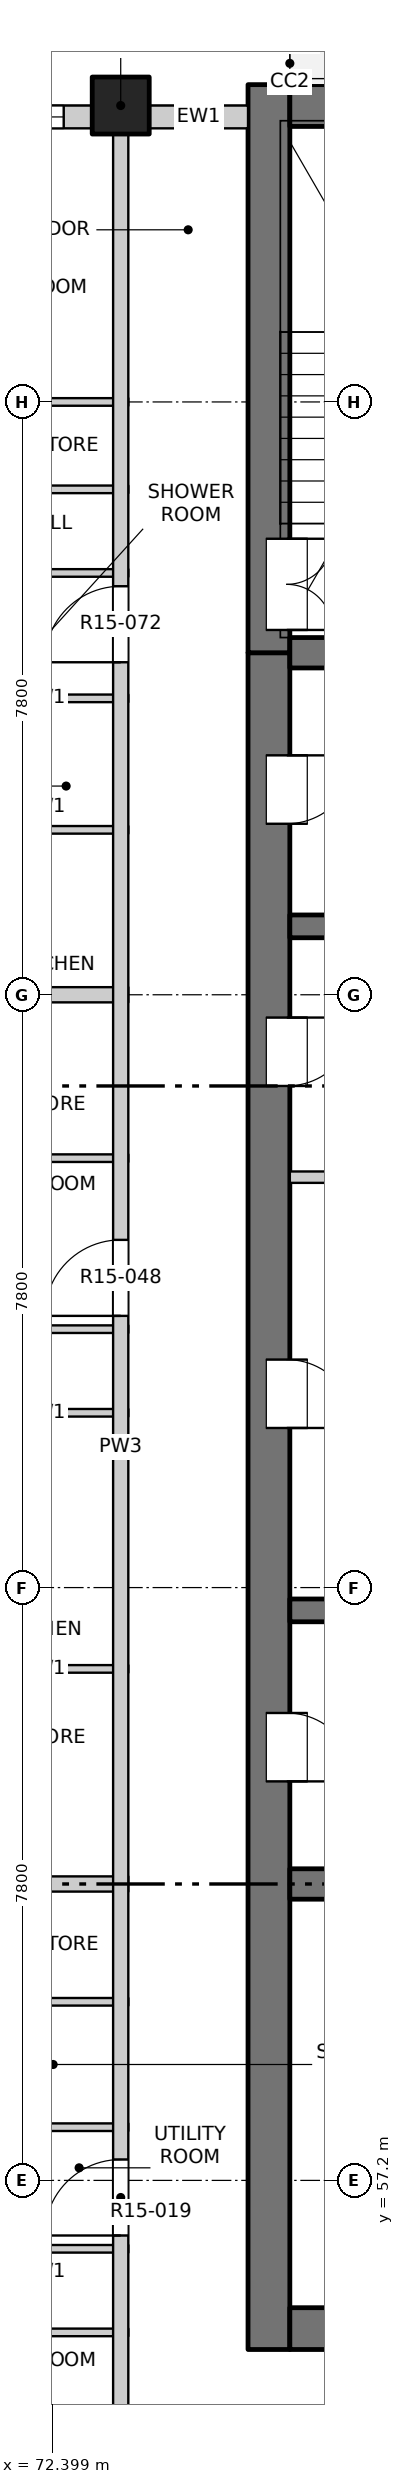
"""IFC4 building model, lengths in metres.
Left out: names, types, materials, properties, quantities, classifications, styles, units other than length and angle.
Written with IfcOpenShell. Run it as: python <this file> out.ifc"""

import sys

from ifc_helpers import new_model, si_unit, direction, frame, frame_2d, origin, origin_2d, place, context, subcontext, project, spatial, rectangle, extrude, element, fill, save


model = new_model("IFC4")
c1 = context("Model", 3, precision=1e-05, world=origin(), true_north=direction((0.0, 1.0)))
c2 = subcontext(c1, "Body", "Model", "MODEL_VIEW")
j1 = project(units=[si_unit("LENGTHUNIT", "METRE"), si_unit("PLANEANGLEUNIT", "RADIAN")], contexts=[c1])
p1 = place(None, origin())
s1 = spatial("IfcSite", under=j1, at=p1, CompositionType="ELEMENT")
p2 = place(p1, origin())
s2 = spatial("IfcBuilding", under=s1, at=p2, CompositionType="ELEMENT")
p3 = place(p2, frame((0.0, 0.0, 158.8)))
s3 = spatial("IfcBuildingStorey", under=s2, at=p3, CompositionType="ELEMENT", Elevation=158.8)
p4 = place(p3, frame((73.3, 84.5, -0.25), z_axis=(0.0, 0.0, 1.0), x_axis=(1.0, 0.0, 0.0)))
e1 = element("IfcColumn", 1, at=p4, inside=s3, PredefinedType="COLUMN", context=c2, shape_type="SweptSolid", body=[
    extrude(rectangle(XDim=0.75, YDim=0.75, at=origin_2d()), origin(), (0.0, 0.0, 1.0), 3.4),
])
p5 = place(p3, frame((75.25, 54.975, -0.25), z_axis=(0.0, 0.0, 1.0), x_axis=(0.0, 1.0, 0.0)))
e2 = element("IfcWall", 2, at=p5, inside=s3, PredefinedType="SOLIDWALL", context=c2, shape_type="SweptSolid", body=[
    extrude(rectangle(XDim=22.325, YDim=0.55, at=frame_2d((11.163, 0.0))), origin(), (0.0, 0.0, 1.0), 3.4),
])
p6 = place(p5, frame((7.475, 0.0, 0.25)))
e3 = element("IfcOpeningElement", 3, at=p6, cuts=e2, PredefinedType="OPENING", context=c2, shape_type="SweptSolid", body=[
    extrude(rectangle(XDim=0.9, YDim=2.1, at=frame_2d((0.45, 1.05))), frame((0.0, 0.285, 0.0), z_axis=(0.0, -1.0, 0.0), x_axis=(1.0, 0.0, 0.0)), (0.0, 0.0, 1.0), 0.57),
])
p7 = place(p5, frame((12.125, 0.0, 0.25)))
e4 = element("IfcOpeningElement", 4, at=p7, cuts=e2, PredefinedType="OPENING", context=c2, shape_type="SweptSolid", body=[
    extrude(rectangle(XDim=0.9, YDim=2.1, at=frame_2d((0.45, 1.05))), frame((0.0, 0.285, 0.0), z_axis=(0.0, -1.0, 0.0), x_axis=(1.0, 0.0, 0.0)), (0.0, 0.0, 1.0), 0.57),
])
p8 = place(p5, frame((16.625, 0.0, 0.25)))
e5 = element("IfcOpeningElement", 5, at=p8, cuts=e2, PredefinedType="OPENING", context=c2, shape_type="SweptSolid", body=[
    extrude(rectangle(XDim=0.9, YDim=2.1, at=frame_2d((0.45, 1.05))), frame((0.0, 0.285, 0.0), z_axis=(0.0, -1.0, 0.0), x_axis=(1.0, 0.0, 0.0)), (0.0, 0.0, 1.0), 0.57),
])
p9 = place(p5, frame((20.075, 0.0, 0.25)))
e6 = element("IfcOpeningElement", 6, at=p9, cuts=e2, PredefinedType="OPENING", context=c2, shape_type="SweptSolid", body=[
    extrude(rectangle(XDim=0.9, YDim=2.1, at=frame_2d((0.45, 1.05))), frame((0.0, 0.285, 0.0), z_axis=(0.0, -1.0, 0.0), x_axis=(1.0, 0.0, 0.0)), (0.0, 0.0, 1.0), 0.57),
])
p10 = place(p3, frame((75.25, 77.3, -0.25), z_axis=(0.0, 0.0, 1.0), x_axis=(0.0, 1.0, 0.0)))
e7 = element("IfcWall", 7, at=p10, inside=s3, PredefinedType="SOLIDWALL", context=c2, shape_type="SweptSolid", body=[
    extrude(rectangle(XDim=7.475, YDim=0.55, at=frame_2d((3.737, 0.0))), origin(), (0.0, 0.0, 1.0), 3.4),
])
p11 = place(p10, frame((0.3, 0.0, 0.25)))
e8 = element("IfcOpeningElement", 8, at=p11, cuts=e7, PredefinedType="OPENING", context=c2, shape_type="SweptSolid", body=[
    extrude(rectangle(XDim=1.2, YDim=2.1, at=frame_2d((0.6, 1.05))), frame((0.0, 0.285, 0.0), z_axis=(0.0, -1.0, 0.0), x_axis=(1.0, 0.0, 0.0)), (0.0, 0.0, 1.0), 0.57),
])
p12 = place(p3, frame((75.525, 55.25, -0.25), z_axis=(0.0, 0.0, 1.0), x_axis=(1.0, 0.0, 0.0)))
e9 = element("IfcWall", 9, at=p12, inside=s3, PredefinedType="SOLIDWALL", context=c2, shape_type="SweptSolid", body=[
    extrude(rectangle(XDim=18.95, YDim=0.55, at=frame_2d((9.475, 0.0))), origin(), (0.0, 0.0, 1.0), 3.4),
])
p13 = place(p12, frame((8.725, 0.0, 0.25)))
e10 = element("IfcOpeningElement", 10, at=p13, cuts=e9, PredefinedType="OPENING", context=c2, shape_type="SweptSolid", body=[
    extrude(rectangle(XDim=1.5, YDim=2.1, at=frame_2d((0.75, 1.05))), frame((0.0, 0.285, 0.0), z_axis=(0.0, -1.0, 0.0), x_axis=(1.0, 0.0, 0.0)), (0.0, 0.0, 1.0), 0.57),
])
p14 = place(p3, frame((75.525, 84.5, -0.25), z_axis=(0.0, 0.0, 1.0), x_axis=(1.0, 0.0, 0.0)))
e11 = element("IfcWall", 11, at=p14, inside=s3, PredefinedType="SOLIDWALL", context=c2, shape_type="SweptSolid", body=[
    extrude(rectangle(XDim=18.95, YDim=0.55, at=frame_2d((9.475, 0.0))), origin(), (0.0, 0.0, 1.0), 3.4),
])
p15 = place(p3, frame((75.525, 61.1, -0.25), z_axis=(0.0, 0.0, 1.0), x_axis=(1.0, 0.0, 0.0)))
e12 = element("IfcWall", 12, at=p15, inside=s3, PredefinedType="SOLIDWALL", context=c2, shape_type="SweptSolid", body=[
    extrude(rectangle(XDim=3.775, YDim=0.4, at=frame_2d((1.888, 0.0))), origin(), (0.0, 0.0, 1.0), 3.4),
])
for number, where, z_axis, x_axis in (
    (13, (75.525, 64.7, -0.25), (0.0, 0.0, 1.0), (1.0, 0.0, 0.0)),
    (14, (75.525, 73.7, -0.25), (0.0, 0.0, 1.0), (1.0, 0.0, 0.0)),
):
    element("IfcWall", number, at=place(p3, frame(where, z_axis=z_axis, x_axis=x_axis)), inside=s3, PredefinedType="SOLIDWALL", context=c2, shape_type="SweptSolid", body=[
        extrude(rectangle(XDim=3.775, YDim=0.3, at=frame_2d((1.888, 0.0))), origin(), (0.0, 0.0, 1.0), 3.4),
    ])
p16 = place(p3, frame((75.525, 77.3, -0.25), z_axis=(0.0, 0.0, 1.0), x_axis=(1.0, 0.0, 0.0)))
e15 = element("IfcWall", 15, at=p16, inside=s3, PredefinedType="SOLIDWALL", context=c2, shape_type="SweptSolid", body=[
    extrude(rectangle(XDim=3.775, YDim=0.4, at=frame_2d((1.888, 0.0))), origin(), (0.0, 0.0, 1.0), 3.4),
])
p17 = place(p3, frame((69.4, 84.35, 0.0), z_axis=(0.0, 0.0, 1.0), x_axis=(1.0, 0.0, 0.0)))
e16 = element("IfcWall", 16, at=p17, inside=s3, PredefinedType="SOLIDWALL", context=c2, shape_type="SweptSolid", body=[
    extrude(rectangle(XDim=3.525, YDim=0.3, at=frame_2d((1.763, 0.0))), origin(), (0.0, 0.0, 1.0), 2.7),
])
p18 = place(p17, frame((0.75, 0.0, 0.9)))
e17 = element("IfcOpeningElement", 17, at=p18, cuts=e16, PredefinedType="OPENING", context=c2, shape_type="SweptSolid", body=[
    extrude(rectangle(XDim=2.4, YDim=1.8, at=frame_2d((1.2, 0.9))), frame((0.0, 0.16, 0.0), z_axis=(0.0, -1.0, 0.0), x_axis=(1.0, 0.0, 0.0)), (0.0, 0.0, 1.0), 0.32),
])
p19 = place(p3, frame((73.675, 84.35, 0.0), z_axis=(0.0, 0.0, 1.0), x_axis=(1.0, 0.0, 0.0)))
e18 = element("IfcWall", 18, at=p19, inside=s3, PredefinedType="SOLIDWALL", context=c2, shape_type="SweptSolid", body=[
    extrude(rectangle(XDim=1.3, YDim=0.3, at=frame_2d((0.65, 0.0))), origin(), (0.0, 0.0, 1.0), 2.7),
])
for number, where, z_axis, x_axis in (
    (19, (71.18, 55.2, 0.0), (0.0, 0.0, 1.0), (1.0, 0.0, 0.0)),
    (20, (71.18, 56.3, 0.0), (0.0, 0.0, 1.0), (1.0, 0.0, 0.0)),
    (21, (71.18, 57.9, 0.0), (0.0, 0.0, 1.0), (1.0, 0.0, 0.0)),
    (22, (71.18, 59.55, 0.0), (0.0, 0.0, 1.0), (1.0, 0.0, 0.0)),
):
    element("IfcWall", number, at=place(p3, frame(where, z_axis=z_axis, x_axis=x_axis)), inside=s3, PredefinedType="PARTITIONING", context=c2, shape_type="SweptSolid", body=[
        extrude(rectangle(XDim=2.22, YDim=0.1, at=frame_2d((1.11, 0.0))), origin(), (0.0, 0.0, 1.0), 3.15),
    ])
p20 = place(p3, frame((65.8, 61.1, 0.0), z_axis=(0.0, 0.0, 1.0), x_axis=(1.0, 0.0, 0.0)))
e23 = element("IfcWall", 23, at=p20, inside=s3, PredefinedType="PARTITIONING", context=c2, shape_type="SweptSolid", body=[
    extrude(rectangle(XDim=7.6, YDim=0.2, at=frame_2d((3.8, 0.0))), origin(), (0.0, 0.0, 1.0), 2.55),
])
for number, where, z_axis, x_axis in (
    (24, (71.18, 63.93, 0.0), (0.0, 0.0, 1.0), (1.0, 0.0, 0.0)),
    (25, (71.18, 67.3, 0.0), (0.0, 0.0, 1.0), (1.0, 0.0, 0.0)),
    (26, (71.18, 68.4, 0.0), (0.0, 0.0, 1.0), (1.0, 0.0, 0.0)),
):
    element("IfcWall", number, at=place(p3, frame(where, z_axis=z_axis, x_axis=x_axis)), inside=s3, PredefinedType="PARTITIONING", context=c2, shape_type="SweptSolid", body=[
        extrude(rectangle(XDim=2.22, YDim=0.1, at=frame_2d((1.11, 0.0))), origin(), (0.0, 0.0, 1.0), 3.15),
    ])
p21 = place(p3, frame((75.525, 70.4, 0.0), z_axis=(0.0, 0.0, 1.0), x_axis=(1.0, 0.0, 0.0)))
e27 = element("IfcWall", 27, at=p21, inside=s3, PredefinedType="PARTITIONING", context=c2, shape_type="SweptSolid", body=[
    extrude(rectangle(XDim=3.775, YDim=0.15, at=frame_2d((1.887, 0.0))), origin(), (0.0, 0.0, 1.0), 3.15),
])
p22 = place(p3, frame((71.18, 70.65, 0.0), z_axis=(0.0, 0.0, 1.0), x_axis=(1.0, 0.0, 0.0)))
e28 = element("IfcWall", 28, at=p22, inside=s3, PredefinedType="PARTITIONING", context=c2, shape_type="SweptSolid", body=[
    extrude(rectangle(XDim=2.22, YDim=0.1, at=frame_2d((1.11, 0.0))), origin(), (0.0, 0.0, 1.0), 3.15),
])
p23 = place(p3, frame((65.8, 72.8, 0.0), z_axis=(0.0, 0.0, 1.0), x_axis=(1.0, 0.0, 0.0)))
e29 = element("IfcWall", 29, at=p23, inside=s3, PredefinedType="PARTITIONING", context=c2, shape_type="SweptSolid", body=[
    extrude(rectangle(XDim=7.6, YDim=0.2, at=frame_2d((3.8, 0.0))), origin(), (0.0, 0.0, 1.0), 3.15),
])
p24 = place(p3, frame((71.18, 74.97, 0.0), z_axis=(0.0, 0.0, 1.0), x_axis=(1.0, 0.0, 0.0)))
e30 = element("IfcWall", 30, at=p24, inside=s3, PredefinedType="PARTITIONING", context=c2, shape_type="SweptSolid", body=[
    extrude(rectangle(XDim=2.22, YDim=0.1, at=frame_2d((1.11, 0.0))), origin(), (0.0, 0.0, 1.0), 3.15),
])
p25 = place(p3, frame((71.18, 76.7, 0.0), z_axis=(0.0, 0.0, 1.0), x_axis=(1.0, 0.0, 0.0)))
e31 = element("IfcWall", 31, at=p25, inside=s3, PredefinedType="PARTITIONING", context=c2, shape_type="SweptSolid", body=[
    extrude(rectangle(XDim=2.22, YDim=0.1, at=frame_2d((1.11, 0.0))), origin(), (0.0, 0.0, 1.0), 2.55),
])
for number, where, z_axis, x_axis in (
    (32, (71.18, 78.35, 0.0), (0.0, 0.0, 1.0), (1.0, 0.0, 0.0)),
    (33, (71.18, 79.45, 0.0), (0.0, 0.0, 1.0), (1.0, 0.0, 0.0)),
):
    element("IfcWall", number, at=place(p3, frame(where, z_axis=z_axis, x_axis=x_axis)), inside=s3, PredefinedType="PARTITIONING", context=c2, shape_type="SweptSolid", body=[
        extrude(rectangle(XDim=2.22, YDim=0.1, at=frame_2d((1.11, 0.0))), origin(), (0.0, 0.0, 1.0), 3.15),
    ])
p26 = place(p3, frame((65.8, 80.6, 0.0), z_axis=(0.0, 0.0, 1.0), x_axis=(1.0, 0.0, 0.0)))
e34 = element("IfcWall", 34, at=p26, inside=s3, PredefinedType="PARTITIONING", context=c2, shape_type="SweptSolid", body=[
    extrude(rectangle(XDim=7.6, YDim=0.1, at=frame_2d((3.8, 0.0))), origin(), (0.0, 0.0, 1.0), 3.15),
])
p27 = place(p26, frame((4.14, 0.0, 0.0)))
e35 = element("IfcOpeningElement", 35, at=p27, cuts=e34, PredefinedType="OPENING", context=c2, shape_type="SweptSolid", body=[
    extrude(rectangle(XDim=0.9, YDim=2.1, at=frame_2d((0.45, 1.05))), frame((0.0, 0.06, 0.0), z_axis=(0.0, -1.0, 0.0), x_axis=(1.0, 0.0, 0.0)), (0.0, 0.0, 1.0), 0.12),
])
p28 = place(p3, frame((73.3, 49.5, 0.0), z_axis=(0.0, 0.0, 1.0), x_axis=(0.0, 1.0, 0.0)))
e36 = element("IfcWall", 36, at=p28, inside=s3, PredefinedType="PARTITIONING", context=c2, shape_type="SweptSolid", body=[
    extrude(rectangle(XDim=34.7, YDim=0.2, at=frame_2d((17.35, 0.0))), origin(), (0.0, 0.0, 1.0), 3.15),
])
p29 = place(p28, frame((6.975, 0.0, 0.0)))
e37 = element("IfcOpeningElement", 37, at=p29, cuts=e36, PredefinedType="OPENING", context=c2, shape_type="SweptSolid", body=[
    extrude(rectangle(XDim=1.0, YDim=2.1, at=frame_2d((0.5, 1.05))), frame((0.0, 0.11, 0.0), z_axis=(0.0, -1.0, 0.0), x_axis=(1.0, 0.0, 0.0)), (0.0, 0.0, 1.0), 0.22),
])
p30 = place(p28, frame((19.075, 0.0, 0.0)))
e38 = element("IfcOpeningElement", 38, at=p30, cuts=e36, PredefinedType="OPENING", context=c2, shape_type="SweptSolid", body=[
    extrude(rectangle(XDim=1.0, YDim=2.1, at=frame_2d((0.5, 1.05))), frame((0.0, 0.11, 0.0), z_axis=(0.0, -1.0, 0.0), x_axis=(1.0, 0.0, 0.0)), (0.0, 0.0, 1.0), 0.22),
])
p31 = place(p28, frame((27.675, 0.0, 0.0)))
e39 = element("IfcOpeningElement", 39, at=p31, cuts=e36, PredefinedType="OPENING", context=c2, shape_type="SweptSolid", body=[
    extrude(rectangle(XDim=1.0, YDim=2.1, at=frame_2d((0.5, 1.05))), frame((0.0, 0.11, 0.0), z_axis=(0.0, -1.0, 0.0), x_axis=(1.0, 0.0, 0.0)), (0.0, 0.0, 1.0), 0.22),
])
p32 = place(p18, origin())
e40 = element("IfcWindow", 40, at=p32, inside=s3, PartitioningType="DOUBLE_PANEL_VERTICAL", PredefinedType="WINDOW", context=c2, shape_type="SweptSolid", body=[
    extrude(rectangle(XDim=2.4, YDim=1.8, at=frame_2d((1.2, 0.9))), frame((0.0, 0.03, 0.0), z_axis=(0.0, -1.0, 0.0), x_axis=(1.0, 0.0, 0.0)), (0.0, 0.0, 1.0), 0.06),
])
fill(e17, e40)
p33 = place(p29, origin())
e41 = element("IfcDoor", 41, at=p33, inside=s3, OperationType="SINGLE_SWING_RIGHT", PredefinedType="DOOR", context=c2, shape_type="SweptSolid", body=[
    extrude(rectangle(XDim=1.0, YDim=2.1, at=frame_2d((0.5, 1.05))), frame((0.0, 0.025, 0.0), z_axis=(0.0, -1.0, 0.0), x_axis=(1.0, 0.0, 0.0)), (0.0, 0.0, 1.0), 0.05),
])
fill(e37, e41)
p34 = place(p6, origin())
e42 = element("IfcDoor", 42, at=p34, inside=s3, OperationType="SINGLE_SWING_RIGHT", PredefinedType="DOOR", context=c2, shape_type="SweptSolid", body=[
    extrude(rectangle(XDim=0.9, YDim=2.1, at=frame_2d((0.45, 1.05))), frame((0.0, -0.21, 0.0), z_axis=(0.0, -1.0, 0.0), x_axis=(1.0, 0.0, 0.0)), (0.0, 0.0, 1.0), 0.05),
])
fill(e3, e42)
p35 = place(p7, origin())
e43 = element("IfcDoor", 43, at=p35, inside=s3, OperationType="SINGLE_SWING_RIGHT", PredefinedType="DOOR", context=c2, shape_type="SweptSolid", body=[
    extrude(rectangle(XDim=0.9, YDim=2.1, at=frame_2d((0.45, 1.05))), frame((0.0, -0.21, 0.0), z_axis=(0.0, -1.0, 0.0), x_axis=(1.0, 0.0, 0.0)), (0.0, 0.0, 1.0), 0.05),
])
fill(e4, e43)
p36 = place(p30, origin())
e44 = element("IfcDoor", 44, at=p36, inside=s3, OperationType="SINGLE_SWING_RIGHT", PredefinedType="DOOR", context=c2, shape_type="SweptSolid", body=[
    extrude(rectangle(XDim=1.0, YDim=2.1, at=frame_2d((0.5, 1.05))), frame((0.0, 0.025, 0.0), z_axis=(0.0, -1.0, 0.0), x_axis=(1.0, 0.0, 0.0)), (0.0, 0.0, 1.0), 0.05),
])
fill(e38, e44)
p37 = place(p8, origin())
e45 = element("IfcDoor", 45, at=p37, inside=s3, OperationType="SINGLE_SWING_LEFT", PredefinedType="DOOR", context=c2, shape_type="SweptSolid", body=[
    extrude(rectangle(XDim=0.9, YDim=2.1, at=frame_2d((0.45, 1.05))), frame((0.0, -0.21, 0.0), z_axis=(0.0, -1.0, 0.0), x_axis=(1.0, 0.0, 0.0)), (0.0, 0.0, 1.0), 0.05),
])
fill(e5, e45)
p38 = place(p9, origin())
e46 = element("IfcDoor", 46, at=p38, inside=s3, OperationType="SINGLE_SWING_LEFT", PredefinedType="DOOR", context=c2, shape_type="SweptSolid", body=[
    extrude(rectangle(XDim=0.9, YDim=2.1, at=frame_2d((0.45, 1.05))), frame((0.0, -0.21, 0.0), z_axis=(0.0, -1.0, 0.0), x_axis=(1.0, 0.0, 0.0)), (0.0, 0.0, 1.0), 0.05),
])
fill(e6, e46)
p39 = place(p31, origin())
e47 = element("IfcDoor", 47, at=p39, inside=s3, OperationType="SINGLE_SWING_LEFT", PredefinedType="DOOR", context=c2, shape_type="SweptSolid", body=[
    extrude(rectangle(XDim=1.0, YDim=2.1, at=frame_2d((0.5, 1.05))), frame((0.0, 0.025, 0.0), z_axis=(0.0, -1.0, 0.0), x_axis=(1.0, 0.0, 0.0)), (0.0, 0.0, 1.0), 0.05),
])
fill(e39, e47)
p40 = place(p11, origin())
e48 = element("IfcDoor", 48, at=p40, inside=s3, OperationType="DOUBLE_DOOR_SINGLE_SWING", PredefinedType="DOOR", context=c2, shape_type="SweptSolid", body=[
    extrude(rectangle(XDim=1.2, YDim=2.1, at=frame_2d((0.6, 1.05))), frame((0.0, -0.21, 0.0), z_axis=(0.0, -1.0, 0.0), x_axis=(1.0, 0.0, 0.0)), (0.0, 0.0, 1.0), 0.05),
])
fill(e8, e48)
save(model, sys.argv[1])
